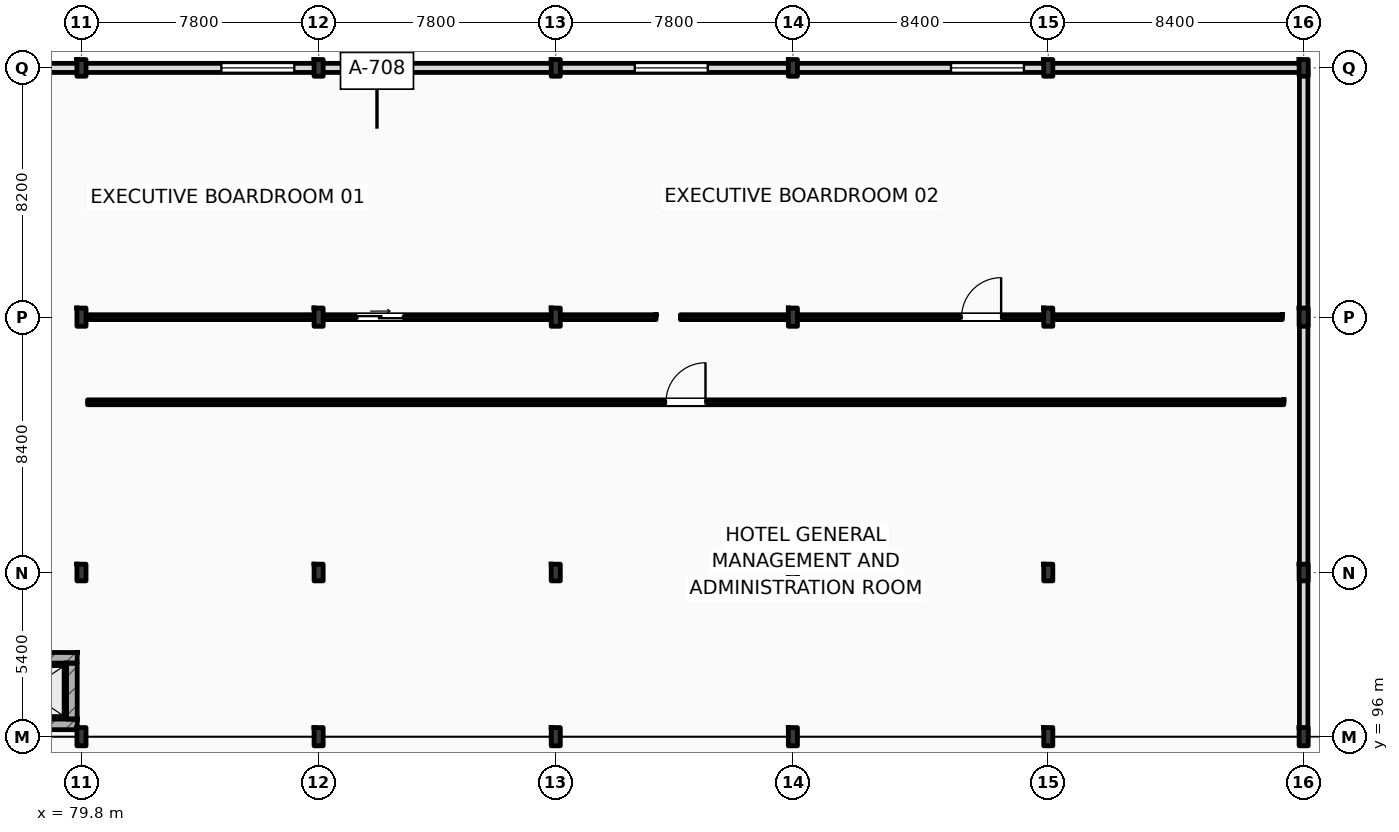
"""IFC4 building model, lengths in metres.
Left out: names, types, materials, properties, quantities, classifications, styles, units other than length and angle.
Written with IfcOpenShell. Run it as: python <this file> out.ifc"""

import sys

from ifc_helpers import new_model, si_unit, direction, frame, frame_2d, origin, origin_2d, place, context, subcontext, project, spatial, rectangle, i_section, extrude, element, fill, save


model = new_model("IFC4")
c1 = context("Model", 3, precision=1e-05, world=origin(), true_north=direction((0.0, 1.0)))
c2 = subcontext(c1, "Body", "Model", "MODEL_VIEW")
j1 = project(units=[si_unit("LENGTHUNIT", "METRE"), si_unit("PLANEANGLEUNIT", "RADIAN")], contexts=[c1])
p1 = place(None, origin())
s1 = spatial("IfcSite", under=j1, at=p1, CompositionType="ELEMENT")
p2 = place(p1, origin())
s2 = spatial("IfcBuilding", under=s1, at=p2, CompositionType="ELEMENT")
p3 = place(p2, frame((0.0, 0.0, 11.4)))
s3 = spatial("IfcBuildingStorey", under=s2, at=p3, CompositionType="ELEMENT", Elevation=11.4)
p4 = place(p3, frame((79.8, 96.0, 0.0), z_axis=(0.0, 0.0, 1.0), x_axis=(1.0, 0.0, 0.0)))
e1 = element("IfcColumn", 1, at=p4, inside=s3, PredefinedType="COLUMN", context=c2, shape_type="SweptSolid", body=[
    extrude(i_section(OverallWidth=0.3, OverallDepth=0.6, WebThickness=0.015, FlangeThickness=0.03, FilletRadius=0.027, at=origin_2d()), origin(), (0.0, 0.0, 1.0), 4.8),
])
p5 = place(p3, frame((79.8, 101.4, 0.0), z_axis=(0.0, 0.0, 1.0), x_axis=(1.0, 0.0, 0.0)))
e2 = element("IfcColumn", 2, at=p5, inside=s3, PredefinedType="COLUMN", context=c2, shape_type="SweptSolid", body=[
    extrude(i_section(OverallWidth=0.3, OverallDepth=0.55, WebThickness=0.015, FlangeThickness=0.029, FilletRadius=0.027, at=origin_2d()), origin(), (0.0, 0.0, 1.0), 4.8),
])
p6 = place(p3, frame((79.8, 109.8, 0.0), z_axis=(0.0, 0.0, 1.0), x_axis=(1.0, 0.0, 0.0)))
e3 = element("IfcColumn", 3, at=p6, inside=s3, PredefinedType="COLUMN", context=c2, shape_type="SweptSolid", body=[
    extrude(i_section(OverallWidth=0.3, OverallDepth=0.6, WebThickness=0.015, FlangeThickness=0.03, FilletRadius=0.027, at=origin_2d()), origin(), (0.0, 0.0, 1.0), 4.8),
])
p7 = place(p3, frame((79.8, 118.0, 0.0), z_axis=(0.0, 0.0, 1.0), x_axis=(1.0, 0.0, 0.0)))
e4 = element("IfcColumn", 4, at=p7, inside=s3, PredefinedType="COLUMN", context=c2, shape_type="SweptSolid", body=[
    extrude(i_section(OverallWidth=0.3, OverallDepth=0.55, WebThickness=0.015, FlangeThickness=0.029, FilletRadius=0.027, at=origin_2d()), origin(), (0.0, 0.0, 1.0), 4.8),
])
p8 = place(p3, frame((87.6, 96.0, 0.0), z_axis=(0.0, 0.0, 1.0), x_axis=(1.0, 0.0, 0.0)))
e5 = element("IfcColumn", 5, at=p8, inside=s3, PredefinedType="COLUMN", context=c2, shape_type="SweptSolid", body=[
    extrude(i_section(OverallWidth=0.3, OverallDepth=0.6, WebThickness=0.015, FlangeThickness=0.03, FilletRadius=0.027, at=origin_2d()), origin(), (0.0, 0.0, 1.0), 4.8),
])
p9 = place(p3, frame((87.6, 101.4, 0.0), z_axis=(0.0, 0.0, 1.0), x_axis=(1.0, 0.0, 0.0)))
e6 = element("IfcColumn", 6, at=p9, inside=s3, PredefinedType="COLUMN", context=c2, shape_type="SweptSolid", body=[
    extrude(i_section(OverallWidth=0.3, OverallDepth=0.55, WebThickness=0.015, FlangeThickness=0.029, FilletRadius=0.027, at=origin_2d()), origin(), (0.0, 0.0, 1.0), 4.8),
])
p10 = place(p3, frame((87.6, 109.8, 0.0), z_axis=(0.0, 0.0, 1.0), x_axis=(1.0, 0.0, 0.0)))
e7 = element("IfcColumn", 7, at=p10, inside=s3, PredefinedType="COLUMN", context=c2, shape_type="SweptSolid", body=[
    extrude(i_section(OverallWidth=0.3, OverallDepth=0.6, WebThickness=0.015, FlangeThickness=0.03, FilletRadius=0.027, at=origin_2d()), origin(), (0.0, 0.0, 1.0), 4.8),
])
p11 = place(p3, frame((87.6, 118.0, 0.0), z_axis=(0.0, 0.0, 1.0), x_axis=(1.0, 0.0, 0.0)))
e8 = element("IfcColumn", 8, at=p11, inside=s3, PredefinedType="COLUMN", context=c2, shape_type="SweptSolid", body=[
    extrude(i_section(OverallWidth=0.3, OverallDepth=0.55, WebThickness=0.015, FlangeThickness=0.029, FilletRadius=0.027, at=origin_2d()), origin(), (0.0, 0.0, 1.0), 4.8),
])
p12 = place(p3, frame((95.4, 96.0, 0.0), z_axis=(0.0, 0.0, 1.0), x_axis=(1.0, 0.0, 0.0)))
e9 = element("IfcColumn", 9, at=p12, inside=s3, PredefinedType="COLUMN", context=c2, shape_type="SweptSolid", body=[
    extrude(i_section(OverallWidth=0.3, OverallDepth=0.6, WebThickness=0.015, FlangeThickness=0.03, FilletRadius=0.027, at=origin_2d()), origin(), (0.0, 0.0, 1.0), 4.8),
])
p13 = place(p3, frame((95.4, 101.4, 0.0), z_axis=(0.0, 0.0, 1.0), x_axis=(1.0, 0.0, 0.0)))
e10 = element("IfcColumn", 10, at=p13, inside=s3, PredefinedType="COLUMN", context=c2, shape_type="SweptSolid", body=[
    extrude(i_section(OverallWidth=0.3, OverallDepth=0.55, WebThickness=0.015, FlangeThickness=0.029, FilletRadius=0.027, at=origin_2d()), origin(), (0.0, 0.0, 1.0), 4.8),
])
p14 = place(p3, frame((95.4, 109.8, 0.0), z_axis=(0.0, 0.0, 1.0), x_axis=(1.0, 0.0, 0.0)))
e11 = element("IfcColumn", 11, at=p14, inside=s3, PredefinedType="COLUMN", context=c2, shape_type="SweptSolid", body=[
    extrude(i_section(OverallWidth=0.3, OverallDepth=0.6, WebThickness=0.015, FlangeThickness=0.03, FilletRadius=0.027, at=origin_2d()), origin(), (0.0, 0.0, 1.0), 4.8),
])
p15 = place(p3, frame((95.4, 118.0, 0.0), z_axis=(0.0, 0.0, 1.0), x_axis=(1.0, 0.0, 0.0)))
e12 = element("IfcColumn", 12, at=p15, inside=s3, PredefinedType="COLUMN", context=c2, shape_type="SweptSolid", body=[
    extrude(i_section(OverallWidth=0.3, OverallDepth=0.55, WebThickness=0.015, FlangeThickness=0.029, FilletRadius=0.027, at=origin_2d()), origin(), (0.0, 0.0, 1.0), 4.8),
])
p16 = place(p3, frame((103.2, 96.0, 0.0), z_axis=(0.0, 0.0, 1.0), x_axis=(1.0, 0.0, 0.0)))
e13 = element("IfcColumn", 13, at=p16, inside=s3, PredefinedType="COLUMN", context=c2, shape_type="SweptSolid", body=[
    extrude(i_section(OverallWidth=0.3, OverallDepth=0.6, WebThickness=0.015, FlangeThickness=0.03, FilletRadius=0.027, at=origin_2d()), origin(), (0.0, 0.0, 1.0), 4.8),
])
p17 = place(p3, frame((103.2, 101.4, 0.0), z_axis=(0.0, 0.0, 1.0), x_axis=(1.0, 0.0, 0.0)))
e14 = element("IfcColumn", 14, at=p17, inside=s3, PredefinedType="COLUMN", context=c2, shape_type="SweptSolid", body=[
    extrude(i_section(OverallWidth=0.3, OverallDepth=0.55, WebThickness=0.015, FlangeThickness=0.029, FilletRadius=0.027, at=origin_2d()), origin(), (0.0, 0.0, 1.0), 4.8),
])
p18 = place(p3, frame((103.2, 109.8, 0.0), z_axis=(0.0, 0.0, 1.0), x_axis=(1.0, 0.0, 0.0)))
e15 = element("IfcColumn", 15, at=p18, inside=s3, PredefinedType="COLUMN", context=c2, shape_type="SweptSolid", body=[
    extrude(i_section(OverallWidth=0.3, OverallDepth=0.6, WebThickness=0.015, FlangeThickness=0.03, FilletRadius=0.027, at=origin_2d()), origin(), (0.0, 0.0, 1.0), 4.8),
])
p19 = place(p3, frame((103.2, 118.0, 0.0), z_axis=(0.0, 0.0, 1.0), x_axis=(1.0, 0.0, 0.0)))
e16 = element("IfcColumn", 16, at=p19, inside=s3, PredefinedType="COLUMN", context=c2, shape_type="SweptSolid", body=[
    extrude(i_section(OverallWidth=0.3, OverallDepth=0.55, WebThickness=0.015, FlangeThickness=0.029, FilletRadius=0.027, at=origin_2d()), origin(), (0.0, 0.0, 1.0), 4.8),
])
p20 = place(p3, frame((111.6, 96.0, 0.0), z_axis=(0.0, 0.0, 1.0), x_axis=(1.0, 0.0, 0.0)))
e17 = element("IfcColumn", 17, at=p20, inside=s3, PredefinedType="COLUMN", context=c2, shape_type="SweptSolid", body=[
    extrude(i_section(OverallWidth=0.3, OverallDepth=0.6, WebThickness=0.015, FlangeThickness=0.03, FilletRadius=0.027, at=origin_2d()), origin(), (0.0, 0.0, 1.0), 4.8),
])
p21 = place(p3, frame((111.6, 101.4, 0.0), z_axis=(0.0, 0.0, 1.0), x_axis=(1.0, 0.0, 0.0)))
e18 = element("IfcColumn", 18, at=p21, inside=s3, PredefinedType="COLUMN", context=c2, shape_type="SweptSolid", body=[
    extrude(i_section(OverallWidth=0.3, OverallDepth=0.55, WebThickness=0.015, FlangeThickness=0.029, FilletRadius=0.027, at=origin_2d()), origin(), (0.0, 0.0, 1.0), 4.8),
])
p22 = place(p3, frame((111.6, 109.8, 0.0), z_axis=(0.0, 0.0, 1.0), x_axis=(1.0, 0.0, 0.0)))
e19 = element("IfcColumn", 19, at=p22, inside=s3, PredefinedType="COLUMN", context=c2, shape_type="SweptSolid", body=[
    extrude(i_section(OverallWidth=0.3, OverallDepth=0.6, WebThickness=0.015, FlangeThickness=0.03, FilletRadius=0.027, at=origin_2d()), origin(), (0.0, 0.0, 1.0), 4.8),
])
p23 = place(p3, frame((111.6, 118.0, 0.0), z_axis=(0.0, 0.0, 1.0), x_axis=(1.0, 0.0, 0.0)))
e20 = element("IfcColumn", 20, at=p23, inside=s3, PredefinedType="COLUMN", context=c2, shape_type="SweptSolid", body=[
    extrude(i_section(OverallWidth=0.3, OverallDepth=0.55, WebThickness=0.015, FlangeThickness=0.029, FilletRadius=0.027, at=origin_2d()), origin(), (0.0, 0.0, 1.0), 4.8),
])
p24 = place(p3, frame((120.0, 96.0, 0.0), z_axis=(0.0, 0.0, 1.0), x_axis=(1.0, 0.0, 0.0)))
e21 = element("IfcColumn", 21, at=p24, inside=s3, PredefinedType="COLUMN", context=c2, shape_type="SweptSolid", body=[
    extrude(i_section(OverallWidth=0.3, OverallDepth=0.6, WebThickness=0.015, FlangeThickness=0.03, FilletRadius=0.027, at=origin_2d()), origin(), (0.0, 0.0, 1.0), 4.8),
])
p25 = place(p3, frame((120.0, 101.4, 0.0), z_axis=(0.0, 0.0, 1.0), x_axis=(1.0, 0.0, 0.0)))
e22 = element("IfcColumn", 22, at=p25, inside=s3, PredefinedType="COLUMN", context=c2, shape_type="SweptSolid", body=[
    extrude(i_section(OverallWidth=0.3, OverallDepth=0.55, WebThickness=0.015, FlangeThickness=0.029, FilletRadius=0.027, at=origin_2d()), origin(), (0.0, 0.0, 1.0), 4.8),
])
p26 = place(p3, frame((120.0, 109.8, 0.0), z_axis=(0.0, 0.0, 1.0), x_axis=(1.0, 0.0, 0.0)))
e23 = element("IfcColumn", 23, at=p26, inside=s3, PredefinedType="COLUMN", context=c2, shape_type="SweptSolid", body=[
    extrude(i_section(OverallWidth=0.3, OverallDepth=0.6, WebThickness=0.015, FlangeThickness=0.03, FilletRadius=0.027, at=origin_2d()), origin(), (0.0, 0.0, 1.0), 4.8),
])
p27 = place(p3, frame((120.0, 118.0, 0.0), z_axis=(0.0, 0.0, 1.0), x_axis=(1.0, 0.0, 0.0)))
e24 = element("IfcColumn", 24, at=p27, inside=s3, PredefinedType="COLUMN", context=c2, shape_type="SweptSolid", body=[
    extrude(i_section(OverallWidth=0.3, OverallDepth=0.55, WebThickness=0.015, FlangeThickness=0.029, FilletRadius=0.027, at=origin_2d()), origin(), (0.0, 0.0, 1.0), 4.8),
])
p28 = place(p3, frame((22.5, 118.0, 0.0), z_axis=(0.0, 0.0, 1.0), x_axis=(1.0, 0.0, 0.0)))
e25 = element("IfcWall", 25, at=p28, inside=s3, PredefinedType="STANDARD", context=c2, shape_type="SweptSolid", body=[
    extrude(rectangle(XDim=97.5, YDim=0.3, at=frame_2d((48.75, 0.0))), origin(), (0.0, 0.0, 1.0), 3.96),
])
p29 = place(p28, frame((3.5, 0.0, 0.95)))
e26 = element("IfcOpeningElement", 26, at=p29, cuts=e25, PredefinedType="OPENING", context=c2, shape_type="SweptSolid", body=[
    extrude(rectangle(XDim=2.4, YDim=2.4, at=frame_2d((1.2, 1.2))), frame((0.0, 0.16, 0.0), z_axis=(0.0, -1.0, 0.0), x_axis=(1.0, 0.0, 0.0)), (0.0, 0.0, 1.0), 0.32),
])
p30 = place(p28, frame((15.1, 0.0, 0.95)))
e27 = element("IfcOpeningElement", 27, at=p30, cuts=e25, PredefinedType="OPENING", context=c2, shape_type="SweptSolid", body=[
    extrude(rectangle(XDim=2.4, YDim=2.4, at=frame_2d((1.2, 1.2))), frame((0.0, 0.16, 0.0), z_axis=(0.0, -1.0, 0.0), x_axis=(1.0, 0.0, 0.0)), (0.0, 0.0, 1.0), 0.32),
])
p31 = place(p28, frame((27.5, 0.0, 0.95)))
e28 = element("IfcOpeningElement", 28, at=p31, cuts=e25, PredefinedType="OPENING", context=c2, shape_type="SweptSolid", body=[
    extrude(rectangle(XDim=2.4, YDim=2.4, at=frame_2d((1.2, 1.2))), frame((0.0, 0.16, 0.0), z_axis=(0.0, -1.0, 0.0), x_axis=(1.0, 0.0, 0.0)), (0.0, 0.0, 1.0), 0.32),
])
p32 = place(p28, frame((38.5, 0.0, 0.95)))
e29 = element("IfcOpeningElement", 29, at=p32, cuts=e25, PredefinedType="OPENING", context=c2, shape_type="SweptSolid", body=[
    extrude(rectangle(XDim=2.4, YDim=2.4, at=frame_2d((1.2, 1.2))), frame((0.0, 0.16, 0.0), z_axis=(0.0, -1.0, 0.0), x_axis=(1.0, 0.0, 0.0)), (0.0, 0.0, 1.0), 0.32),
])
p33 = place(p28, frame((51.5, 0.0, 0.95)))
e30 = element("IfcOpeningElement", 30, at=p33, cuts=e25, PredefinedType="OPENING", context=c2, shape_type="SweptSolid", body=[
    extrude(rectangle(XDim=2.4, YDim=2.4, at=frame_2d((1.2, 1.2))), frame((0.0, 0.16, 0.0), z_axis=(0.0, -1.0, 0.0), x_axis=(1.0, 0.0, 0.0)), (0.0, 0.0, 1.0), 0.32),
])
p34 = place(p28, frame((61.9, 0.0, 0.95)))
e31 = element("IfcOpeningElement", 31, at=p34, cuts=e25, PredefinedType="OPENING", context=c2, shape_type="SweptSolid", body=[
    extrude(rectangle(XDim=2.4, YDim=2.4, at=frame_2d((1.2, 1.2))), frame((0.0, 0.16, 0.0), z_axis=(0.0, -1.0, 0.0), x_axis=(1.0, 0.0, 0.0)), (0.0, 0.0, 1.0), 0.32),
])
p35 = place(p28, frame((75.5, 0.0, 0.95)))
e32 = element("IfcOpeningElement", 32, at=p35, cuts=e25, PredefinedType="OPENING", context=c2, shape_type="SweptSolid", body=[
    extrude(rectangle(XDim=2.4, YDim=2.4, at=frame_2d((1.2, 1.2))), frame((0.0, 0.16, 0.0), z_axis=(0.0, -1.0, 0.0), x_axis=(1.0, 0.0, 0.0)), (0.0, 0.0, 1.0), 0.32),
])
p36 = place(p28, frame((85.9, 0.0, 0.95)))
e33 = element("IfcOpeningElement", 33, at=p36, cuts=e25, PredefinedType="OPENING", context=c2, shape_type="SweptSolid", body=[
    extrude(rectangle(XDim=2.4, YDim=2.4, at=frame_2d((1.2, 1.2))), frame((0.0, 0.16, 0.0), z_axis=(0.0, -1.0, 0.0), x_axis=(1.0, 0.0, 0.0)), (0.0, 0.0, 1.0), 0.32),
])
p37 = place(p3, frame((120.0, 96.0, 0.0), z_axis=(0.0, 0.0, 1.0), x_axis=(0.0, 1.0, 0.0)))
e34 = element("IfcWall", 34, at=p37, inside=s3, PredefinedType="STANDARD", context=c2, shape_type="SweptSolid", body=[
    extrude(rectangle(XDim=22.0, YDim=0.28, at=frame_2d((11.0, 0.0))), origin(), (0.0, 0.0, 1.0), 4.11),
])
p38 = place(p3, frame((76.67, 98.595, 0.0), z_axis=(0.0, 0.0, 1.0), x_axis=(1.0, 0.0, 0.0)))
e35 = element("IfcWall", 35, at=p38, inside=s3, PredefinedType="SHEAR", context=c2, shape_type="SweptSolid", body=[
    extrude(rectangle(XDim=2.99, YDim=0.35, at=frame_2d((1.495, 0.0))), origin(), (0.0, 0.0, 1.0), 4.52),
])
p39 = place(p38, frame((0.695, 0.0, 0.0)))
e36 = element("IfcOpeningElement", 36, at=p39, cuts=e35, PredefinedType="OPENING", context=c2, shape_type="SweptSolid", body=[
    extrude(rectangle(XDim=1.25, YDim=2.25, at=frame_2d((0.625, 1.125))), frame((0.0, 0.185, 0.0), z_axis=(0.0, -1.0, 0.0), x_axis=(1.0, 0.0, 0.0)), (0.0, 0.0, 1.0), 0.37),
])
p40 = place(p3, frame((76.67, 96.405, 0.0), z_axis=(0.0, 0.0, 1.0), x_axis=(1.0, 0.0, 0.0)))
e37 = element("IfcWall", 37, at=p40, inside=s3, PredefinedType="SHEAR", context=c2, shape_type="SweptSolid", body=[
    extrude(rectangle(XDim=2.99, YDim=0.35, at=frame_2d((1.495, 0.0))), origin(), (0.0, 0.0, 1.0), 4.52),
])
p41 = place(p3, frame((79.485, 96.58, 0.0), z_axis=(0.0, 0.0, 1.0), x_axis=(0.0, 1.0, 0.0)))
e38 = element("IfcWall", 38, at=p41, inside=s3, PredefinedType="SHEAR", context=c2, shape_type="SweptSolid", body=[
    extrude(rectangle(XDim=1.84, YDim=0.35, at=frame_2d((0.92, 0.0))), origin(), (0.0, 0.0, 1.0), 4.11),
])
p42 = place(p3, frame((80.05, 109.8, 0.0), z_axis=(0.0, 0.0, 1.0), x_axis=(1.0, 0.0, 0.0)))
e39 = element("IfcWall", 39, at=p42, inside=s3, PredefinedType="PARTITIONING", context=c2, shape_type="SweptSolid", body=[
    extrude(rectangle(XDim=18.65, YDim=0.16, at=frame_2d((9.325, 0.0))), origin(), (0.0, 0.0, 1.0), 4.06),
])
p43 = place(p42, frame((8.825, 0.0, 0.0)))
e40 = element("IfcOpeningElement", 40, at=p43, cuts=e39, PredefinedType="OPENING", context=c2, shape_type="SweptSolid", body=[
    extrude(rectangle(XDim=1.5, YDim=2.25, at=frame_2d((0.75, 1.125))), frame((0.0, 0.09, 0.0), z_axis=(0.0, -1.0, 0.0), x_axis=(1.0, 0.0, 0.0)), (0.0, 0.0, 1.0), 0.18),
])
p44 = place(p3, frame((99.5, 109.8, 0.0), z_axis=(0.0, 0.0, 1.0), x_axis=(1.0, 0.0, 0.0)))
e41 = element("IfcWall", 41, at=p44, inside=s3, PredefinedType="PARTITIONING", context=c2, shape_type="SweptSolid", body=[
    extrude(rectangle(XDim=19.8, YDim=0.16, at=frame_2d((9.9, 0.0))), origin(), (0.0, 0.0, 1.0), 3.96),
])
p45 = place(p44, frame((9.25, 0.0, 0.0)))
e42 = element("IfcOpeningElement", 42, at=p45, cuts=e41, PredefinedType="OPENING", context=c2, shape_type="SweptSolid", body=[
    extrude(rectangle(XDim=1.3, YDim=2.2, at=frame_2d((0.65, 1.1))), frame((0.0, 0.09, 0.0), z_axis=(0.0, -1.0, 0.0), x_axis=(1.0, 0.0, 0.0)), (0.0, 0.0, 1.0), 0.18),
])
p46 = place(p3, frame((80.0, 107.0, 0.0), z_axis=(0.0, 0.0, 1.0), x_axis=(1.0, 0.0, 0.0)))
e43 = element("IfcWall", 43, at=p46, inside=s3, PredefinedType="PARTITIONING", context=c2, shape_type="SweptSolid", body=[
    extrude(rectangle(XDim=39.35, YDim=0.16, at=frame_2d((19.675, 0.0))), origin(), (0.0, 0.0, 1.0), 4.52),
])
p47 = place(p46, frame((19.025, 0.0, 0.0)))
e44 = element("IfcOpeningElement", 44, at=p47, cuts=e43, PredefinedType="OPENING", context=c2, shape_type="SweptSolid", body=[
    extrude(rectangle(XDim=1.3, YDim=2.2, at=frame_2d((0.65, 1.1))), frame((0.0, 0.09, 0.0), z_axis=(0.0, -1.0, 0.0), x_axis=(1.0, 0.0, 0.0)), (0.0, 0.0, 1.0), 0.18),
])
p48 = place(p34, origin())
e45 = element("IfcWindow", 45, at=p48, inside=s3, PartitioningType="DOUBLE_PANEL_VERTICAL", PredefinedType="WINDOW", context=c2, shape_type="SweptSolid", body=[
    extrude(rectangle(XDim=2.4, YDim=2.4, at=frame_2d((1.2, 1.2))), frame((0.0, 0.03, 0.0), z_axis=(0.0, -1.0, 0.0), x_axis=(1.0, 0.0, 0.0)), (0.0, 0.0, 1.0), 0.06),
])
fill(e31, e45)
p49 = place(p35, origin())
e46 = element("IfcWindow", 46, at=p49, inside=s3, PartitioningType="DOUBLE_PANEL_VERTICAL", PredefinedType="WINDOW", context=c2, shape_type="SweptSolid", body=[
    extrude(rectangle(XDim=2.4, YDim=2.4, at=frame_2d((1.2, 1.2))), frame((0.0, 0.03, 0.0), z_axis=(0.0, -1.0, 0.0), x_axis=(1.0, 0.0, 0.0)), (0.0, 0.0, 1.0), 0.06),
])
fill(e32, e46)
p50 = place(p36, origin())
e47 = element("IfcWindow", 47, at=p50, inside=s3, PartitioningType="DOUBLE_PANEL_VERTICAL", PredefinedType="WINDOW", context=c2, shape_type="SweptSolid", body=[
    extrude(rectangle(XDim=2.4, YDim=2.4, at=frame_2d((1.2, 1.2))), frame((0.0, 0.03, 0.0), z_axis=(0.0, -1.0, 0.0), x_axis=(1.0, 0.0, 0.0)), (0.0, 0.0, 1.0), 0.06),
])
fill(e33, e47)
p51 = place(p43, origin())
e48 = element("IfcDoor", 48, at=p51, inside=s3, OperationType="SLIDING_TO_RIGHT", PredefinedType="DOOR", context=c2, shape_type="SweptSolid", body=[
    extrude(rectangle(XDim=1.5, YDim=2.25, at=frame_2d((0.75, 1.125))), frame((0.0, 0.025, 0.0), z_axis=(0.0, -1.0, 0.0), x_axis=(1.0, 0.0, 0.0)), (0.0, 0.0, 1.0), 0.05),
])
fill(e40, e48)
p52 = place(p45, origin())
e49 = element("IfcDoor", 49, at=p52, inside=s3, OperationType="SINGLE_SWING_RIGHT", PredefinedType="DOOR", context=c2, shape_type="SweptSolid", body=[
    extrude(rectangle(XDim=1.3, YDim=2.2, at=frame_2d((0.65, 1.1))), frame((0.0, 0.025, 0.0), z_axis=(0.0, -1.0, 0.0), x_axis=(1.0, 0.0, 0.0)), (0.0, 0.0, 1.0), 0.05),
])
fill(e42, e49)
p53 = place(p47, origin())
e50 = element("IfcDoor", 50, at=p53, inside=s3, OperationType="SINGLE_SWING_RIGHT", PredefinedType="DOOR", context=c2, shape_type="SweptSolid", body=[
    extrude(rectangle(XDim=1.3, YDim=2.2, at=frame_2d((0.65, 1.1))), frame((0.0, 0.025, 0.0), z_axis=(0.0, -1.0, 0.0), x_axis=(1.0, 0.0, 0.0)), (0.0, 0.0, 1.0), 0.05),
])
fill(e44, e50)
save(model, sys.argv[1])
